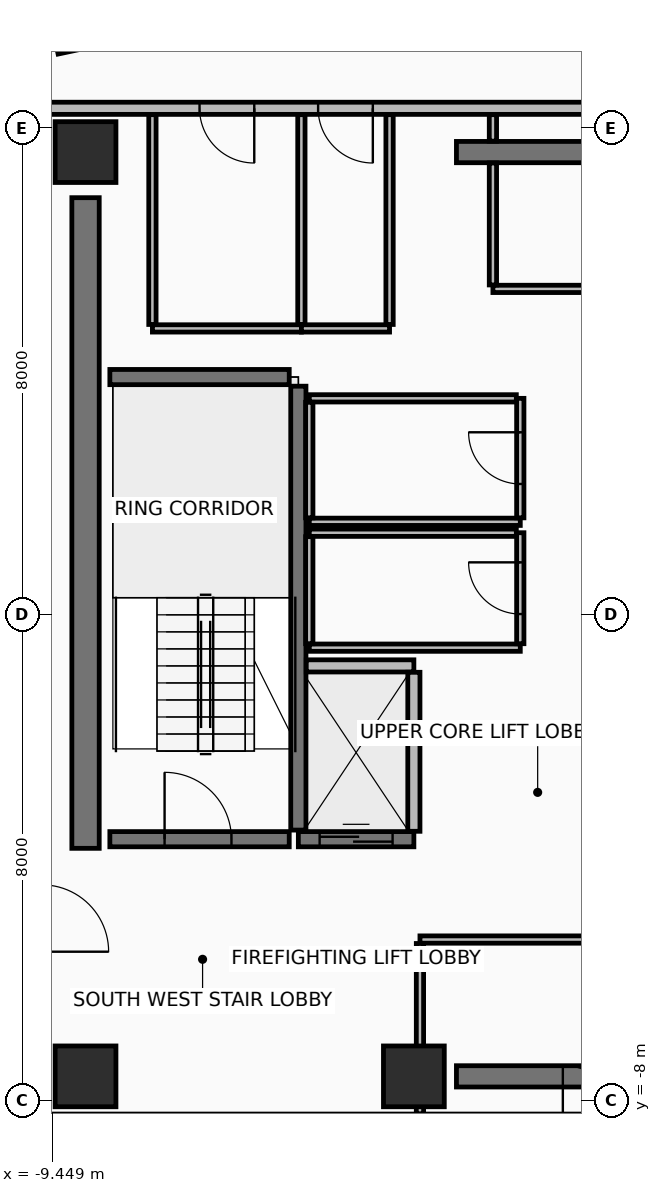
"""IFC4 building model, lengths in metres.
Left out: names, types, materials, properties, quantities, classifications, styles, units other than length and angle.
Written with IfcOpenShell. Run it as: python <this file> out.ifc"""

import sys

from ifc_helpers import new_model, si_unit, direction, frame, frame_2d, origin, origin_2d, place, context, subcontext, project, spatial, rectangle, hollow_rectangle, extrude, element, fill, save


model = new_model("IFC4")
c1 = context("Model", 3, precision=1e-05, world=origin(), true_north=direction((0.0, 1.0)))
c2 = subcontext(c1, "Body", "Model", "MODEL_VIEW")
j1 = project(units=[si_unit("LENGTHUNIT", "METRE"), si_unit("PLANEANGLEUNIT", "RADIAN")], contexts=[c1])
p1 = place(None, origin())
s1 = spatial("IfcSite", under=j1, at=p1, CompositionType="ELEMENT")
p2 = place(p1, origin())
s2 = spatial("IfcBuilding", under=s1, at=p2, CompositionType="ELEMENT")
p3 = place(p2, frame((0.0, 0.0, 283.4)))
s3 = spatial("IfcBuildingStorey", under=s2, at=p3, CompositionType="ELEMENT", Elevation=283.4)
for number, where, z_axis, x_axis in (
    (1, (-8.9, -7.6, 0.0), (0.0, 0.0, 1.0), (1.0, 0.0, 0.0)),
    (2, (-3.5, -7.6, 0.0), (0.0, 0.0, 1.0), (1.0, 0.0, 0.0)),
    (3, (-8.9, 7.6, 0.0), (0.0, 0.0, 1.0), (1.0, 0.0, 0.0)),
):
    element("IfcColumn", number, at=place(p3, frame(where, z_axis=z_axis, x_axis=x_axis)), inside=s3, PredefinedType="COLUMN", context=c2, shape_type="SweptSolid", body=[
        extrude(rectangle(XDim=1.0, YDim=1.0, at=origin_2d()), origin(), (0.0, 0.0, 1.0), 3.65),
    ])
p4 = place(p3, frame((-9.197, 9.449, 0.0), z_axis=(0.0, 0.0, 1.0), x_axis=(0.978147237858, 0.207913398007, 0.0)))
e4 = element("IfcColumn", 4, at=p4, inside=s3, PredefinedType="COLUMN", context=c2, shape_type="SweptSolid", body=[
    extrude(hollow_rectangle(XDim=0.4, YDim=0.4, WallThickness=0.025, at=origin_2d()), origin(), (0.0, 0.0, 1.0), 3.65),
])
for number, where, z_axis, x_axis in (
    (5, (-2.8, -7.6, 0.0), (0.0, 0.0, 1.0), (1.0, 0.0, 0.0)),
    (6, (-2.8, 7.6, 0.0), (0.0, 0.0, 1.0), (1.0, 0.0, 0.0)),
):
    element("IfcWall", number, at=place(p3, frame(where, z_axis=z_axis, x_axis=x_axis)), inside=s3, PredefinedType="SHEAR", context=c2, shape_type="SweptSolid", body=[
        extrude(rectangle(XDim=5.38, YDim=0.35, at=frame_2d((2.69, 0.0))), origin(), (0.0, 0.0, 1.0), 3.465),
    ])
p5 = place(p3, frame((-8.9, -3.85, 0.0), z_axis=(0.0, 0.0, 1.0), x_axis=(0.0, 1.0, 0.0)))
e7 = element("IfcWall", 7, at=p5, inside=s3, PredefinedType="SHEAR", context=c2, shape_type="SweptSolid", body=[
    extrude(rectangle(XDim=10.7, YDim=0.45, at=frame_2d((5.35, 0.0))), origin(), (0.0, 0.0, 1.0), 3.465),
])
p6 = place(p3, frame((9.62, 8.32, 0.0), z_axis=(0.0, 0.0, 1.0), x_axis=(-1.0, 0.0, 0.0)))
e8 = element("IfcWall", 8, at=p6, inside=s3, PredefinedType="PARTITIONING", context=c2, shape_type="SweptSolid", body=[
    extrude(rectangle(XDim=19.24, YDim=0.2, at=frame_2d((9.62, 0.0))), origin(), (0.0, 0.0, 1.0), 2.96),
])
p7 = place(p6, frame((8.67, 0.0, 0.0)))
e9 = element("IfcOpeningElement", 9, at=p7, cuts=e8, PredefinedType="OPENING", context=c2, shape_type="SweptSolid", body=[
    extrude(rectangle(XDim=0.9, YDim=2.1, at=frame_2d((0.45, 1.05))), frame((0.0, 0.11, 0.0), z_axis=(0.0, -1.0, 0.0), x_axis=(1.0, 0.0, 0.0)), (0.0, 0.0, 1.0), 0.22),
])
p8 = place(p6, frame((15.745, 0.0, 0.0)))
e10 = element("IfcOpeningElement", 10, at=p8, cuts=e8, PredefinedType="OPENING", context=c2, shape_type="SweptSolid", body=[
    extrude(rectangle(XDim=0.9, YDim=2.1, at=frame_2d((0.45, 1.05))), frame((0.0, 0.11, 0.0), z_axis=(0.0, -1.0, 0.0), x_axis=(1.0, 0.0, 0.0)), (0.0, 0.0, 1.0), 0.22),
])
p9 = place(p6, frame((13.795, 0.0, 0.0)))
e11 = element("IfcOpeningElement", 11, at=p9, cuts=e8, PredefinedType="OPENING", context=c2, shape_type="SweptSolid", body=[
    extrude(rectangle(XDim=0.9, YDim=2.1, at=frame_2d((0.45, 1.05))), frame((0.0, 0.11, 0.0), z_axis=(0.0, -1.0, 0.0), x_axis=(1.0, 0.0, 0.0)), (0.0, 0.0, 1.0), 0.22),
])
p10 = place(p3, frame((-5.4, -3.55, 0.0), z_axis=(0.0, 0.0, 1.0), x_axis=(0.0, 1.0, 0.0)))
e12 = element("IfcWall", 12, at=p10, inside=s3, PredefinedType="SHEAR", context=c2, shape_type="SweptSolid", body=[
    extrude(rectangle(XDim=7.3, YDim=0.25, at=frame_2d((3.65, 0.0))), origin(), (0.0, 0.0, 1.0), 3.465),
])
p11 = place(p3, frame((-8.5, -3.7, 0.0), z_axis=(0.0, 0.0, 1.0), x_axis=(1.0, 0.0, 0.0)))
e13 = element("IfcWall", 13, at=p11, inside=s3, PredefinedType="SHEAR", context=c2, shape_type="SweptSolid", body=[
    extrude(rectangle(XDim=2.95, YDim=0.25, at=frame_2d((1.475, 0.0))), origin(), (0.0, 0.0, 1.0), 3.465),
])
p12 = place(p11, frame((0.9, 0.0, 0.0)))
e14 = element("IfcOpeningElement", 14, at=p12, cuts=e13, PredefinedType="OPENING", context=c2, shape_type="SweptSolid", body=[
    extrude(rectangle(XDim=1.1, YDim=2.15, at=frame_2d((0.55, 1.075))), frame((0.0, 0.135, 0.0), z_axis=(0.0, -1.0, 0.0), x_axis=(1.0, 0.0, 0.0)), (0.0, 0.0, 1.0), 0.27),
])
p13 = place(p3, frame((-8.5, 3.9, 0.0), z_axis=(0.0, 0.0, 1.0), x_axis=(1.0, 0.0, 0.0)))
e15 = element("IfcWall", 15, at=p13, inside=s3, PredefinedType="SHEAR", context=c2, shape_type="SweptSolid", body=[
    extrude(rectangle(XDim=2.95, YDim=0.25, at=frame_2d((1.475, 0.0))), origin(), (0.0, 0.0, 1.0), 3.465),
])
p14 = place(p3, frame((-5.4, -3.7, 0.0), z_axis=(0.0, 0.0, 1.0), x_axis=(1.0, 0.0, 0.0)))
e16 = element("IfcWall", 16, at=p14, inside=s3, PredefinedType="SHEAR", context=c2, shape_type="SweptSolid", body=[
    extrude(rectangle(XDim=1.9, YDim=0.25, at=frame_2d((0.95, 0.0))), origin(), (0.0, 0.0, 1.0), 3.465),
])
p15 = place(p14, frame((0.35, 0.0, 0.0)))
e17 = element("IfcOpeningElement", 17, at=p15, cuts=e16, PredefinedType="OPENING", context=c2, shape_type="SweptSolid", body=[
    extrude(rectangle(XDim=1.2, YDim=2.2, at=frame_2d((0.6, 1.1))), frame((0.0, 0.135, 0.0), z_axis=(0.0, -1.0, 0.0), x_axis=(1.0, 0.0, 0.0)), (0.0, 0.0, 1.0), 0.27),
])
p16 = place(p3, frame((-5.27, -0.85, 0.0), z_axis=(0.0, 0.0, 1.0), x_axis=(1.0, 0.0, 0.0)))
e18 = element("IfcWall", 18, at=p16, inside=s3, PredefinedType="PARTITIONING", context=c2, shape_type="SweptSolid", body=[
    extrude(rectangle(XDim=1.77, YDim=0.2, at=frame_2d((0.885, 0.0))), origin(), (0.0, 0.0, 1.0), 3.465),
])
p17 = place(p3, frame((-3.5, -3.57, 0.0), z_axis=(0.0, 0.0, 1.0), x_axis=(0.0, 1.0, 0.0)))
e19 = element("IfcWall", 19, at=p17, inside=s3, PredefinedType="PARTITIONING", context=c2, shape_type="SweptSolid", body=[
    extrude(rectangle(XDim=2.615, YDim=0.2, at=frame_2d((1.308, 0.0))), origin(), (0.0, 0.0, 1.0), 3.465),
])
p18 = place(p3, frame((-5.22, 1.52, 0.0), z_axis=(0.0, 0.0, 1.0), x_axis=(1.0, 0.0, 0.0)))
e20 = element("IfcWall", 20, at=p18, inside=s3, PredefinedType="PARTITIONING", context=c2, shape_type="SweptSolid", body=[
    extrude(rectangle(XDim=3.47, YDim=0.12, at=frame_2d((1.735, 0.0))), origin(), (0.0, 0.0, 1.0), 3.465),
])
p19 = place(p3, frame((-1.75, 1.585, 0.0), z_axis=(0.0, 0.0, 1.0), x_axis=(0.0, 1.0, 0.0)))
e21 = element("IfcWall", 21, at=p19, inside=s3, PredefinedType="PARTITIONING", context=c2, shape_type="SweptSolid", body=[
    extrude(rectangle(XDim=1.965, YDim=0.12, at=frame_2d((0.982, 0.0))), origin(), (0.0, 0.0, 1.0), 3.465),
])
p20 = place(p19, frame((0.557, 0.0, 0.0)))
e22 = element("IfcOpeningElement", 22, at=p20, cuts=e21, PredefinedType="OPENING", context=c2, shape_type="SweptSolid", body=[
    extrude(rectangle(XDim=0.85, YDim=2.1, at=frame_2d((0.425, 1.05))), frame((0.0, 0.07, 0.0), z_axis=(0.0, -1.0, 0.0), x_axis=(1.0, 0.0, 0.0)), (0.0, 0.0, 1.0), 0.14),
])
p21 = place(p3, frame((-1.815, 3.55, 0.0), z_axis=(0.0, 0.0, 1.0), x_axis=(-1.0, 0.0, 0.0)))
e23 = element("IfcWall", 23, at=p21, inside=s3, PredefinedType="PARTITIONING", context=c2, shape_type="SweptSolid", body=[
    extrude(rectangle(XDim=3.405, YDim=0.12, at=frame_2d((1.703, 0.0))), origin(), (0.0, 0.0, 1.0), 3.465),
])
p22 = place(p3, frame((-5.22, 3.485, 0.0), z_axis=(0.0, 0.0, 1.0), x_axis=(0.0, -1.0, 0.0)))
e24 = element("IfcWall", 24, at=p22, inside=s3, PredefinedType="PARTITIONING", context=c2, shape_type="SweptSolid", body=[
    extrude(rectangle(XDim=1.9, YDim=0.12, at=frame_2d((0.95, 0.0))), origin(), (0.0, 0.0, 1.0), 3.465),
])
p23 = place(p3, frame((-5.22, -0.55, 0.0), z_axis=(0.0, 0.0, 1.0), x_axis=(1.0, 0.0, 0.0)))
e25 = element("IfcWall", 25, at=p23, inside=s3, PredefinedType="PARTITIONING", context=c2, shape_type="SweptSolid", body=[
    extrude(rectangle(XDim=3.47, YDim=0.12, at=frame_2d((1.735, 0.0))), origin(), (0.0, 0.0, 1.0), 3.465),
])
p24 = place(p3, frame((-1.75, -0.485, 0.0), z_axis=(0.0, 0.0, 1.0), x_axis=(0.0, 1.0, 0.0)))
e26 = element("IfcWall", 26, at=p24, inside=s3, PredefinedType="PARTITIONING", context=c2, shape_type="SweptSolid", body=[
    extrude(rectangle(XDim=1.825, YDim=0.12, at=frame_2d((0.913, 0.0))), origin(), (0.0, 0.0, 1.0), 3.465),
])
p25 = place(p24, frame((0.488, 0.0, 0.0)))
e27 = element("IfcOpeningElement", 27, at=p25, cuts=e26, PredefinedType="OPENING", context=c2, shape_type="SweptSolid", body=[
    extrude(rectangle(XDim=0.85, YDim=2.1, at=frame_2d((0.425, 1.05))), frame((0.0, 0.07, 0.0), z_axis=(0.0, -1.0, 0.0), x_axis=(1.0, 0.0, 0.0)), (0.0, 0.0, 1.0), 0.14),
])
p26 = place(p3, frame((-1.815, 1.34, 0.0), z_axis=(0.0, 0.0, 1.0), x_axis=(-1.0, 0.0, 0.0)))
e28 = element("IfcWall", 28, at=p26, inside=s3, PredefinedType="PARTITIONING", context=c2, shape_type="SweptSolid", body=[
    extrude(rectangle(XDim=3.405, YDim=0.12, at=frame_2d((1.703, 0.0))), origin(), (0.0, 0.0, 1.0), 3.465),
])
p27 = place(p3, frame((-5.22, 1.275, 0.0), z_axis=(0.0, 0.0, 1.0), x_axis=(0.0, -1.0, 0.0)))
e29 = element("IfcWall", 29, at=p27, inside=s3, PredefinedType="PARTITIONING", context=c2, shape_type="SweptSolid", body=[
    extrude(rectangle(XDim=1.76, YDim=0.12, at=frame_2d((0.88, 0.0))), origin(), (0.0, 0.0, 1.0), 3.465),
])
p28 = place(p3, frame((2.135, -5.35, 0.0), z_axis=(0.0, 0.0, 1.0), x_axis=(-1.0, 0.0, 0.0)))
e30 = element("IfcWall", 30, at=p28, inside=s3, PredefinedType="PARTITIONING", context=c2, shape_type="SweptSolid", body=[
    extrude(rectangle(XDim=5.535, YDim=0.12, at=frame_2d((2.768, 0.0))), origin(), (0.0, 0.0, 1.0), 2.76),
])
p29 = place(p3, frame((-3.4, -5.415, 0.0), z_axis=(0.0, 0.0, 1.0), x_axis=(0.0, -1.0, 0.0)))
e31 = element("IfcWall", 31, at=p29, inside=s3, PredefinedType="PARTITIONING", context=c2, shape_type="SweptSolid", body=[
    extrude(rectangle(XDim=2.8, YDim=0.12, at=frame_2d((1.4, 0.0))), origin(), (0.0, 0.0, 1.0), 2.76),
])
p30 = place(p3, frame((-2.2, 5.35, 0.0), z_axis=(0.0, 0.0, 1.0), x_axis=(1.0, 0.0, 0.0)))
e32 = element("IfcWall", 32, at=p30, inside=s3, PredefinedType="PARTITIONING", context=c2, shape_type="SweptSolid", body=[
    extrude(rectangle(XDim=5.4, YDim=0.12, at=frame_2d((2.7, 0.0))), origin(), (0.0, 0.0, 1.0), 2.76),
])
p31 = place(p3, frame((-2.2, 8.215, 0.0), z_axis=(0.0, 0.0, 1.0), x_axis=(0.0, -1.0, 0.0)))
e33 = element("IfcWall", 33, at=p31, inside=s3, PredefinedType="PARTITIONING", context=c2, shape_type="SweptSolid", body=[
    extrude(rectangle(XDim=0.435, YDim=0.12, at=frame_2d((0.218, 0.0))), origin(), (0.0, 0.0, 1.0), 2.76),
])
p32 = place(p3, frame((-2.2, 7.42, 0.0), z_axis=(0.0, 0.0, 1.0), x_axis=(0.0, -1.0, 0.0)))
e34 = element("IfcWall", 34, at=p32, inside=s3, PredefinedType="PARTITIONING", context=c2, shape_type="SweptSolid", body=[
    extrude(rectangle(XDim=2.005, YDim=0.12, at=frame_2d((1.002, 0.0))), origin(), (0.0, 0.0, 1.0), 2.76),
])
p33 = place(p3, frame((-7.8, 4.7, 0.0), z_axis=(0.0, 0.0, 1.0), x_axis=(1.0, 0.0, 0.0)))
e35 = element("IfcWall", 35, at=p33, inside=s3, PredefinedType="PARTITIONING", context=c2, shape_type="SweptSolid", body=[
    extrude(rectangle(XDim=2.45, YDim=0.12, at=frame_2d((1.225, 0.0))), origin(), (0.0, 0.0, 1.0), 3.465),
])
for number, where, z_axis, x_axis in (
    (36, (-5.35, 4.765, 0.0), (0.0, 0.0, 1.0), (0.0, 1.0, 0.0)),
    (37, (-7.8, 8.215, 0.0), (0.0, 0.0, 1.0), (0.0, -1.0, 0.0)),
):
    element("IfcWall", number, at=place(p3, frame(where, z_axis=z_axis, x_axis=x_axis)), inside=s3, PredefinedType="PARTITIONING", context=c2, shape_type="SweptSolid", body=[
        extrude(rectangle(XDim=3.45, YDim=0.12, at=frame_2d((1.725, 0.0))), origin(), (0.0, 0.0, 1.0), 2.76),
    ])
p34 = place(p3, frame((-5.35, 4.7, 0.0), z_axis=(0.0, 0.0, 1.0), x_axis=(1.0, 0.0, 0.0)))
e38 = element("IfcWall", 38, at=p34, inside=s3, PredefinedType="PARTITIONING", context=c2, shape_type="SweptSolid", body=[
    extrude(rectangle(XDim=1.45, YDim=0.12, at=frame_2d((0.725, 0.0))), origin(), (0.0, 0.0, 1.0), 3.465),
])
p35 = place(p3, frame((-3.9, 4.765, 0.0), z_axis=(0.0, 0.0, 1.0), x_axis=(0.0, 1.0, 0.0)))
e39 = element("IfcWall", 39, at=p35, inside=s3, PredefinedType="PARTITIONING", context=c2, shape_type="SweptSolid", body=[
    extrude(rectangle(XDim=3.45, YDim=0.12, at=frame_2d((1.725, 0.0))), origin(), (0.0, 0.0, 1.0), 2.76),
])
p36 = place(p12, origin())
e40 = element("IfcDoor", 40, at=p36, inside=s3, OperationType="SINGLE_SWING_LEFT", PredefinedType="DOOR", context=c2, shape_type="SweptSolid", body=[
    extrude(rectangle(XDim=1.1, YDim=2.15, at=frame_2d((0.55, 1.075))), frame((0.0, 0.025, 0.0), z_axis=(0.0, -1.0, 0.0), x_axis=(1.0, 0.0, 0.0)), (0.0, 0.0, 1.0), 0.05),
])
fill(e14, e40)
p37 = place(p15, origin())
e41 = element("IfcDoor", 41, at=p37, inside=s3, OperationType="SLIDING_TO_RIGHT", PredefinedType="DOOR", context=c2, shape_type="SweptSolid", body=[
    extrude(rectangle(XDim=1.2, YDim=2.2, at=frame_2d((0.6, 1.1))), frame((0.0, 0.025, 0.0), z_axis=(0.0, -1.0, 0.0), x_axis=(1.0, 0.0, 0.0)), (0.0, 0.0, 1.0), 0.05),
])
fill(e17, e41)
p38 = place(p20, frame((0.85, 0.0, 0.0), z_axis=(0.0, 0.0, 1.0), x_axis=(-1.0, 0.0, 0.0)))
e42 = element("IfcDoor", 42, at=p38, inside=s3, OperationType="SINGLE_SWING_RIGHT", PredefinedType="DOOR", context=c2, shape_type="SweptSolid", body=[
    extrude(rectangle(XDim=0.85, YDim=2.1, at=frame_2d((0.425, 1.05))), frame((0.0, 0.025, 0.0), z_axis=(0.0, -1.0, 0.0), x_axis=(1.0, 0.0, 0.0)), (0.0, 0.0, 1.0), 0.05),
])
fill(e22, e42)
p39 = place(p25, frame((0.85, 0.0, 0.0), z_axis=(0.0, 0.0, 1.0), x_axis=(-1.0, 0.0, 0.0)))
e43 = element("IfcDoor", 43, at=p39, inside=s3, OperationType="SINGLE_SWING_RIGHT", PredefinedType="DOOR", context=c2, shape_type="SweptSolid", body=[
    extrude(rectangle(XDim=0.85, YDim=2.1, at=frame_2d((0.425, 1.05))), frame((0.0, 0.025, 0.0), z_axis=(0.0, -1.0, 0.0), x_axis=(1.0, 0.0, 0.0)), (0.0, 0.0, 1.0), 0.05),
])
fill(e27, e43)
p40 = place(p8, origin())
e44 = element("IfcDoor", 44, at=p40, inside=s3, OperationType="SINGLE_SWING_LEFT", PredefinedType="DOOR", context=c2, shape_type="SweptSolid", body=[
    extrude(rectangle(XDim=0.9, YDim=2.1, at=frame_2d((0.45, 1.05))), frame((0.0, 0.025, 0.0), z_axis=(0.0, -1.0, 0.0), x_axis=(1.0, 0.0, 0.0)), (0.0, 0.0, 1.0), 0.05),
])
fill(e10, e44)
p41 = place(p9, origin())
e45 = element("IfcDoor", 45, at=p41, inside=s3, OperationType="SINGLE_SWING_LEFT", PredefinedType="DOOR", context=c2, shape_type="SweptSolid", body=[
    extrude(rectangle(XDim=0.9, YDim=2.1, at=frame_2d((0.45, 1.05))), frame((0.0, 0.025, 0.0), z_axis=(0.0, -1.0, 0.0), x_axis=(1.0, 0.0, 0.0)), (0.0, 0.0, 1.0), 0.05),
])
fill(e11, e45)
save(model, sys.argv[1])
